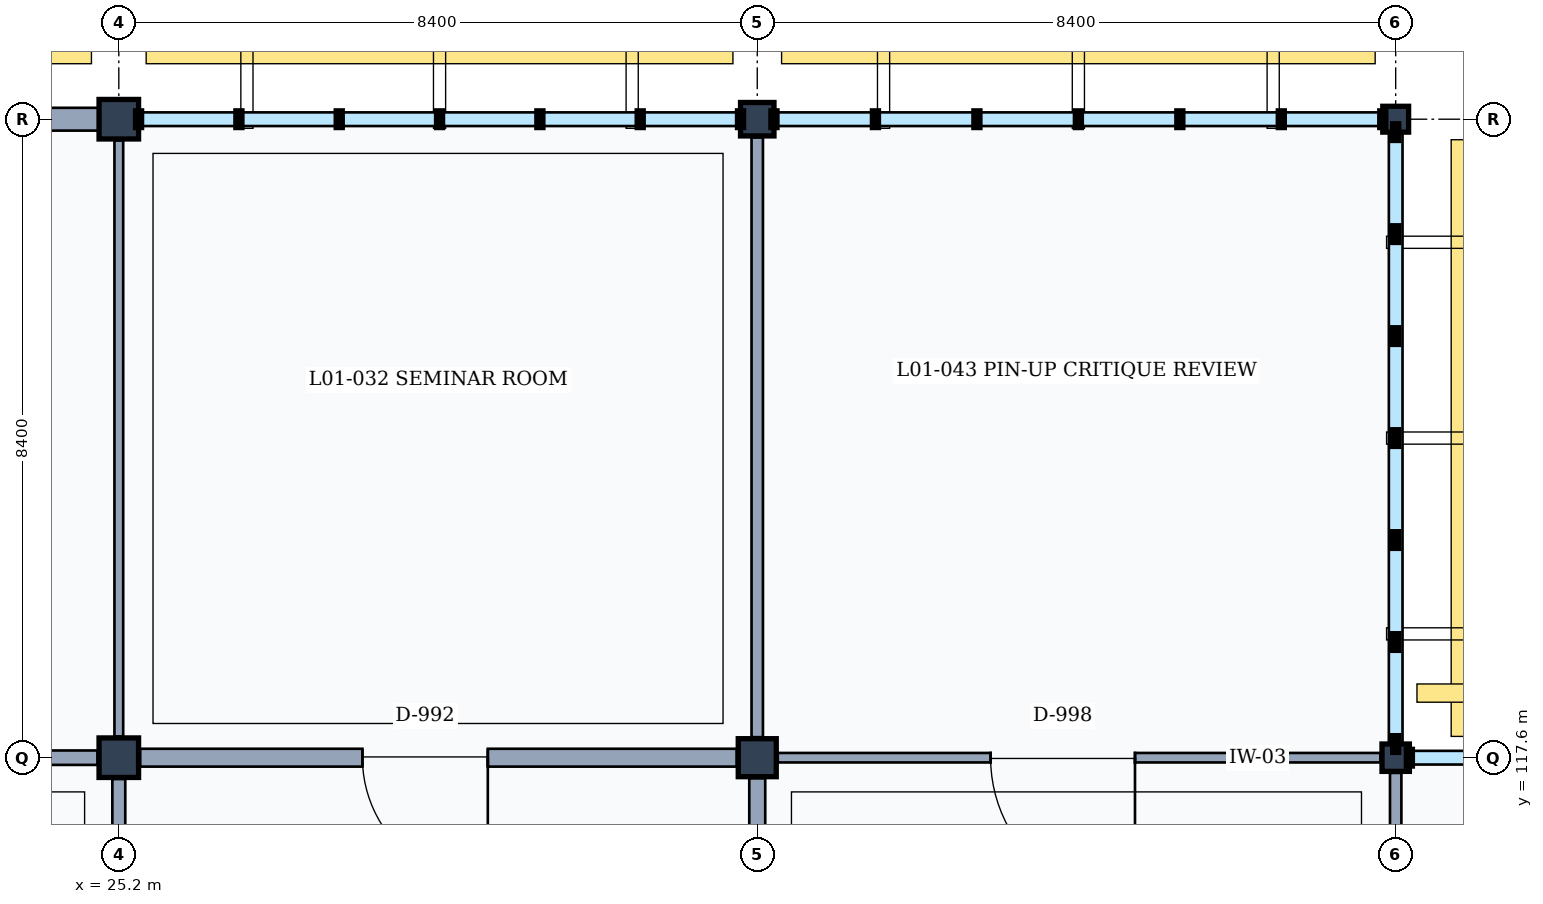
"""IFC4 building model, lengths in metres.
Left out: names, types, materials, properties, quantities, classifications, styles, units other than length and angle.
Written with IfcOpenShell. Run it as: python <this file> out.ifc"""

import sys

from ifc_helpers import new_model, si_unit, direction, frame, frame_2d, origin, origin_2d, place, context, subcontext, project, spatial, rectangle, extrude, element, fill, save


model = new_model("IFC4")
c1 = context("Model", 3, precision=1e-05, world=origin(), true_north=direction((0.0, 1.0)))
c2 = subcontext(c1, "Body", "Model", "MODEL_VIEW")
j1 = project(units=[si_unit("LENGTHUNIT", "METRE"), si_unit("PLANEANGLEUNIT", "RADIAN")], contexts=[c1])
p1 = place(None, origin())
s1 = spatial("IfcSite", under=j1, at=p1, CompositionType="ELEMENT")
p2 = place(p1, origin())
s2 = spatial("IfcBuilding", under=s1, at=p2, CompositionType="ELEMENT")
p3 = place(p2, frame((0.0, 0.0, 4.8)))
s3 = spatial("IfcBuildingStorey", under=s2, at=p3, CompositionType="ELEMENT", Elevation=4.8)
for number, where, z_axis, x_axis in (
    (1, (25.2, 117.6, 0.0), (0.0, 0.0, 1.0), (1.0, 0.0, 0.0)),
    (2, (25.2, 126.0, 0.0), (0.0, 0.0, 1.0), (1.0, 0.0, 0.0)),
):
    element("IfcColumn", number, at=place(p3, frame(where, z_axis=z_axis, x_axis=x_axis)), inside=s3, PredefinedType="COLUMN", context=c2, shape_type="SweptSolid", body=[
        extrude(rectangle(XDim=0.52, YDim=0.52, at=origin_2d()), origin(), (0.0, 0.0, 1.0), 4.8),
    ])
p4 = place(p3, frame((33.6, 117.6, 0.0), z_axis=(0.0, 0.0, 1.0), x_axis=(1.0, 0.0, 0.0)))
e3 = element("IfcColumn", 3, at=p4, inside=s3, PredefinedType="COLUMN", context=c2, shape_type="SweptSolid", body=[
    extrude(rectangle(XDim=0.5, YDim=0.5, at=origin_2d()), origin(), (0.0, 0.0, 1.0), 4.8),
])
p5 = place(p3, frame((33.6, 126.0, 0.0), z_axis=(0.0, 0.0, 1.0), x_axis=(1.0, 0.0, 0.0)))
e4 = element("IfcColumn", 4, at=p5, inside=s3, PredefinedType="COLUMN", context=c2, shape_type="SweptSolid", body=[
    extrude(rectangle(XDim=0.44, YDim=0.44, at=origin_2d()), origin(), (0.0, 0.0, 1.0), 4.8),
])
p6 = place(p3, frame((42.0, 117.6, 0.0), z_axis=(0.0, 0.0, 1.0), x_axis=(1.0, 0.0, 0.0)))
e5 = element("IfcColumn", 5, at=p6, inside=s3, PredefinedType="COLUMN", context=c2, shape_type="SweptSolid", body=[
    extrude(rectangle(XDim=0.36, YDim=0.36, at=origin_2d()), origin(), (0.0, 0.0, 1.0), 4.8),
])
p7 = place(p3, frame((42.0, 126.0, 0.0), z_axis=(0.0, 0.0, 1.0), x_axis=(1.0, 0.0, 0.0)))
e6 = element("IfcColumn", 6, at=p7, inside=s3, PredefinedType="COLUMN", context=c2, shape_type="SweptSolid", body=[
    extrude(rectangle(XDim=0.34, YDim=0.34, at=origin_2d()), origin(), (0.0, 0.0, 1.0), 4.8),
])
p8 = place(p3, frame((17.06, 126.0, 0.0), z_axis=(0.0, 0.0, 1.0), x_axis=(1.0, 0.0, 0.0)))
e7 = element("IfcWall", 7, at=p8, inside=s3, PredefinedType="SOLIDWALL", context=c2, shape_type="SweptSolid", body=[
    extrude(rectangle(XDim=7.88, YDim=0.3, at=frame_2d((3.94, 0.0))), origin(), (0.0, 0.0, 1.0), 3.96),
])
p9 = place(p8, frame((3.065, 0.0, 0.9)))
e8 = element("IfcOpeningElement", 8, at=p9, cuts=e7, PredefinedType="OPENING", context=c2, shape_type="SweptSolid", body=[
    extrude(rectangle(XDim=1.75, YDim=1.85, at=frame_2d((0.875, 0.925))), frame((0.0, 0.16, 0.0), z_axis=(0.0, -1.0, 0.0), x_axis=(1.0, 0.0, 0.0)), (0.0, 0.0, 1.0), 0.32),
])
p10 = place(p3, frame((25.2, 109.48, 0.0), z_axis=(0.0, 0.0, 1.0), x_axis=(0.0, 1.0, 0.0)))
e9 = element("IfcWall", 9, at=p10, inside=s3, PredefinedType="PARTITIONING", context=c2, shape_type="SweptSolid", body=[
    extrude(rectangle(XDim=7.84, YDim=0.17, at=frame_2d((3.92, 0.0))), origin(), (0.0, 0.0, 1.0), 3.92),
])
p11 = place(p3, frame((17.08, 117.6, 0.0), z_axis=(0.0, 0.0, 1.0), x_axis=(1.0, 0.0, 0.0)))
e10 = element("IfcWall", 10, at=p11, inside=s3, PredefinedType="PARTITIONING", context=c2, shape_type="SweptSolid", body=[
    extrude(rectangle(XDim=7.84, YDim=0.19, at=frame_2d((3.92, 0.0))), origin(), (0.0, 0.0, 1.0), 3.92),
])
p12 = place(p11, frame((3.125, 0.0, 0.0)))
e11 = element("IfcOpeningElement", 11, at=p12, cuts=e10, PredefinedType="OPENING", context=c2, shape_type="SweptSolid", body=[
    extrude(rectangle(XDim=1.25, YDim=2.3, at=frame_2d((0.625, 1.15))), frame((0.0, 0.105, 0.0), z_axis=(0.0, -1.0, 0.0), x_axis=(1.0, 0.0, 0.0)), (0.0, 0.0, 1.0), 0.21),
])
p13 = place(p3, frame((25.2, 117.88, 0.0), z_axis=(0.0, 0.0, 1.0), x_axis=(0.0, 1.0, 0.0)))
e12 = element("IfcWall", 12, at=p13, inside=s3, PredefinedType="PARTITIONING", context=c2, shape_type="SweptSolid", body=[
    extrude(rectangle(XDim=7.84, YDim=0.115, at=frame_2d((3.92, 0.0))), origin(), (0.0, 0.0, 1.0), 3.92),
])
p14 = place(p3, frame((33.6, 109.46, 0.0), z_axis=(0.0, 0.0, 1.0), x_axis=(0.0, 1.0, 0.0)))
e13 = element("IfcWall", 13, at=p14, inside=s3, PredefinedType="PARTITIONING", context=c2, shape_type="SweptSolid", body=[
    extrude(rectangle(XDim=7.87, YDim=0.21, at=frame_2d((3.935, 0.0))), origin(), (0.0, 0.0, 1.0), 3.92),
])
p15 = place(p3, frame((25.48, 117.6, 0.0), z_axis=(0.0, 0.0, 1.0), x_axis=(1.0, 0.0, 0.0)))
e14 = element("IfcWall", 14, at=p15, inside=s3, PredefinedType="PARTITIONING", context=c2, shape_type="SweptSolid", body=[
    extrude(rectangle(XDim=7.85, YDim=0.235, at=frame_2d((3.925, 0.0))), origin(), (0.0, 0.0, 1.0), 3.89),
])
p16 = place(p15, frame((2.925, 0.0, 0.0)))
e15 = element("IfcOpeningElement", 15, at=p16, cuts=e14, PredefinedType="OPENING", context=c2, shape_type="SweptSolid", body=[
    extrude(rectangle(XDim=1.65, YDim=2.25, at=frame_2d((0.825, 1.125))), frame((0.0, 0.127, 0.0), z_axis=(0.0, -1.0, 0.0), x_axis=(1.0, 0.0, 0.0)), (0.0, 0.0, 1.0), 0.255),
])
p17 = place(p3, frame((33.6, 117.87, 0.0), z_axis=(0.0, 0.0, 1.0), x_axis=(0.0, 1.0, 0.0)))
e16 = element("IfcWall", 16, at=p17, inside=s3, PredefinedType="PARTITIONING", context=c2, shape_type="SweptSolid", body=[
    extrude(rectangle(XDim=7.89, YDim=0.15, at=frame_2d((3.945, 0.0))), origin(), (0.0, 0.0, 1.0), 3.92),
])
p18 = place(p3, frame((42.0, 109.39, 0.0), z_axis=(0.0, 0.0, 1.0), x_axis=(0.0, 1.0, 0.0)))
e17 = element("IfcWall", 17, at=p18, inside=s3, PredefinedType="PARTITIONING", context=c2, shape_type="SweptSolid", body=[
    extrude(rectangle(XDim=8.01, YDim=0.15, at=frame_2d((4.005, 0.0))), origin(), (0.0, 0.0, 1.0), 3.92),
])
p19 = place(p3, frame((33.87, 117.6, 0.0), z_axis=(0.0, 0.0, 1.0), x_axis=(1.0, 0.0, 0.0)))
e18 = element("IfcWall", 18, at=p19, inside=s3, PredefinedType="PARTITIONING", context=c2, shape_type="SweptSolid", body=[
    extrude(rectangle(XDim=7.93, YDim=0.125, at=frame_2d((3.965, 0.0))), origin(), (0.0, 0.0, 1.0), 3.89),
])
p20 = place(p19, frame((2.8, 0.0, 0.0)))
e19 = element("IfcOpeningElement", 19, at=p20, cuts=e18, PredefinedType="OPENING", context=c2, shape_type="SweptSolid", body=[
    extrude(rectangle(XDim=1.9, YDim=2.4, at=frame_2d((0.95, 1.2))), frame((0.0, 0.073, 0.0), z_axis=(0.0, -1.0, 0.0), x_axis=(1.0, 0.0, 0.0)), (0.0, 0.0, 1.0), 0.145),
])
p21 = place(p16, frame((1.65, 0.0, 0.0), z_axis=(0.0, 0.0, 1.0), x_axis=(-1.0, 0.0, 0.0)))
e20 = element("IfcDoor", 20, at=p21, inside=s3, OperationType="SINGLE_SWING_LEFT", PredefinedType="DOOR", context=c2, shape_type="SweptSolid", body=[
    extrude(rectangle(XDim=1.65, YDim=2.25, at=frame_2d((0.825, 1.125))), frame((0.0, 0.025, 0.0), z_axis=(0.0, -1.0, 0.0), x_axis=(1.0, 0.0, 0.0)), (0.0, 0.0, 1.0), 0.05),
])
fill(e15, e20)
p22 = place(p20, frame((1.9, 0.0, 0.0), z_axis=(0.0, 0.0, 1.0), x_axis=(-1.0, 0.0, 0.0)))
e21 = element("IfcDoor", 21, at=p22, inside=s3, OperationType="SINGLE_SWING_LEFT", PredefinedType="DOOR", context=c2, shape_type="SweptSolid", body=[
    extrude(rectangle(XDim=1.9, YDim=2.4, at=frame_2d((0.95, 1.2))), frame((0.0, 0.025, 0.0), z_axis=(0.0, -1.0, 0.0), x_axis=(1.0, 0.0, 0.0)), (0.0, 0.0, 1.0), 0.05),
])
fill(e19, e21)
save(model, sys.argv[1])
